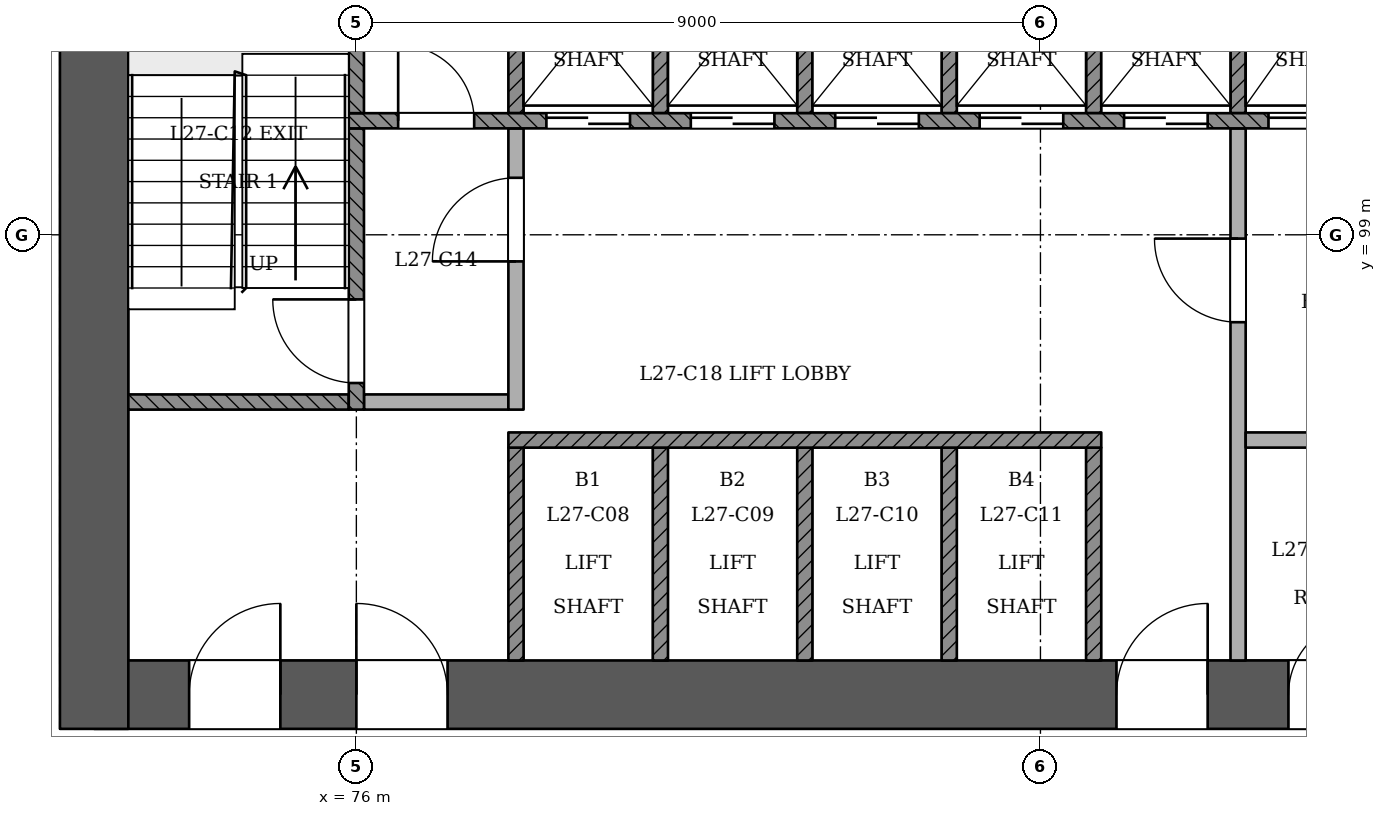
"""IFC4 building model, lengths in metres.
Left out: names, types, materials, properties, quantities, classifications, styles, units other than length and angle.
Written with IfcOpenShell. Run it as: python <this file> out.ifc"""

import sys

from ifc_helpers import new_model, si_unit, direction, frame, frame_2d, origin, place, context, subcontext, project, spatial, rectangle, extrude, element, fill, save


model = new_model("IFC4")
c1 = context("Model", 3, precision=1e-05, world=origin(), true_north=direction((0.0, 1.0)))
c2 = subcontext(c1, "Body", "Model", "MODEL_VIEW")
j1 = project(units=[si_unit("LENGTHUNIT", "METRE"), si_unit("PLANEANGLEUNIT", "RADIAN")], contexts=[c1])
p1 = place(None, origin())
s1 = spatial("IfcSite", under=j1, at=p1, CompositionType="ELEMENT")
p2 = place(p1, origin())
s2 = spatial("IfcBuilding", under=s1, at=p2, CompositionType="ELEMENT")
p3 = place(p2, frame((0.0, 0.0, 108.0)))
s3 = spatial("IfcBuildingStorey", under=s2, at=p3, CompositionType="ELEMENT", Elevation=108.0)
p4 = place(p3, frame((72.55, 92.95, 0.0), z_axis=(0.0, 0.0, 1.0), x_axis=(1.0, 0.0, 0.0)))
e1 = element("IfcWall", 1, at=p4, inside=s3, PredefinedType="SHEAR", context=c2, shape_type="SweptSolid", body=[
    extrude(rectangle(XDim=25.35, YDim=0.9, at=frame_2d((12.675, 0.0))), origin(), (0.0, 0.0, 1.0), 3.6),
])
p5 = place(p4, frame((1.25, 0.0, 0.0)))
e2 = element("IfcOpeningElement", 2, at=p5, cuts=e1, PredefinedType="OPENING", context=c2, shape_type="SweptSolid", body=[
    extrude(rectangle(XDim=1.2, YDim=2.1, at=frame_2d((0.6, 1.05))), frame((0.0, 0.46, 0.0), z_axis=(0.0, -1.0, 0.0), x_axis=(1.0, 0.0, 0.0)), (0.0, 0.0, 1.0), 0.921),
])
p6 = place(p4, frame((3.45, 0.0, 0.0)))
e3 = element("IfcOpeningElement", 3, at=p6, cuts=e1, PredefinedType="OPENING", context=c2, shape_type="SweptSolid", body=[
    extrude(rectangle(XDim=1.2, YDim=2.1, at=frame_2d((0.6, 1.05))), frame((0.0, 0.46, 0.0), z_axis=(0.0, -1.0, 0.0), x_axis=(1.0, 0.0, 0.0)), (0.0, 0.0, 1.0), 0.921),
])
p7 = place(p4, frame((13.45, 0.0, 0.0)))
e4 = element("IfcOpeningElement", 4, at=p7, cuts=e1, PredefinedType="OPENING", context=c2, shape_type="SweptSolid", body=[
    extrude(rectangle(XDim=1.2, YDim=2.1, at=frame_2d((0.6, 1.05))), frame((0.0, 0.46, 0.0), z_axis=(0.0, -1.0, 0.0), x_axis=(1.0, 0.0, 0.0)), (0.0, 0.0, 1.0), 0.921),
])
p8 = place(p4, frame((15.712, 0.0, 0.0)))
e5 = element("IfcOpeningElement", 5, at=p8, cuts=e1, PredefinedType="OPENING", context=c2, shape_type="SweptSolid", body=[
    extrude(rectangle(XDim=1.0, YDim=2.1, at=frame_2d((0.5, 1.05))), frame((0.0, 0.46, 0.0), z_axis=(0.0, -1.0, 0.0), x_axis=(1.0, 0.0, 0.0)), (0.0, 0.0, 1.0), 0.921),
])
p9 = place(p4, frame((18.35, 0.0, 0.0)))
e6 = element("IfcOpeningElement", 6, at=p9, cuts=e1, PredefinedType="OPENING", context=c2, shape_type="SweptSolid", body=[
    extrude(rectangle(XDim=1.0, YDim=2.1, at=frame_2d((0.5, 1.05))), frame((0.0, 0.46, 0.0), z_axis=(0.0, -1.0, 0.0), x_axis=(1.0, 0.0, 0.0)), (0.0, 0.0, 1.0), 0.921),
])
p10 = place(p4, frame((21.938, 0.0, 0.0)))
e7 = element("IfcOpeningElement", 7, at=p10, cuts=e1, PredefinedType="OPENING", context=c2, shape_type="SweptSolid", body=[
    extrude(rectangle(XDim=1.0, YDim=2.1, at=frame_2d((0.5, 1.05))), frame((0.0, 0.46, 0.0), z_axis=(0.0, -1.0, 0.0), x_axis=(1.0, 0.0, 0.0)), (0.0, 0.0, 1.0), 0.921),
])
p11 = place(p3, frame((72.55, 103.85, 0.0), z_axis=(0.0, 0.0, 1.0), x_axis=(0.0, -1.0, 0.0)))
e8 = element("IfcWall", 8, at=p11, inside=s3, PredefinedType="SHEAR", context=c2, shape_type="SweptSolid", body=[
    extrude(rectangle(XDim=11.35, YDim=0.9, at=frame_2d((5.675, 0.0))), origin(), (0.0, 0.0, 1.0), 3.6),
])
p12 = place(p3, frame((63.866, 97.84, 0.0), z_axis=(0.0, 0.0, 1.0), x_axis=(0.499996899578, -0.866027193807, 0.0)))
e9 = element("IfcWall", 9, at=p12, inside=s3, PredefinedType="PARTITIONING", context=c2, shape_type="SweptSolid", body=[
    extrude(rectangle(XDim=41.505, YDim=0.15, at=frame_2d((20.752, 0.0))), origin(), (0.0, 0.0, 1.0), 2.7),
])
p13 = place(p12, frame((2.792, 0.0, 0.0)))
e10 = element("IfcOpeningElement", 10, at=p13, cuts=e9, PredefinedType="OPENING", context=c2, shape_type="SweptSolid", body=[
    extrude(rectangle(XDim=1.2, YDim=2.1, at=frame_2d((0.6, 1.05))), frame((0.0, 0.085, 0.0), z_axis=(0.0, -1.0, 0.0), x_axis=(1.0, 0.0, 0.0)), (0.0, 0.0, 1.0), 0.171),
])
p14 = place(p12, frame((11.153, 0.0, 0.0)))
e11 = element("IfcOpeningElement", 11, at=p14, cuts=e9, PredefinedType="OPENING", context=c2, shape_type="SweptSolid", body=[
    extrude(rectangle(XDim=1.2, YDim=2.1, at=frame_2d((0.6, 1.05))), frame((0.0, 0.085, 0.0), z_axis=(0.0, -1.0, 0.0), x_axis=(1.0, 0.0, 0.0)), (0.0, 0.0, 1.0), 0.171),
])
p15 = place(p12, frame((22.403, 0.0, 0.0)))
e12 = element("IfcOpeningElement", 12, at=p15, cuts=e9, PredefinedType="OPENING", context=c2, shape_type="SweptSolid", body=[
    extrude(rectangle(XDim=1.2, YDim=2.1, at=frame_2d((0.6, 1.05))), frame((0.0, 0.085, 0.0), z_axis=(0.0, -1.0, 0.0), x_axis=(1.0, 0.0, 0.0)), (0.0, 0.0, 1.0), 0.171),
])
p16 = place(p12, frame((32.553, 0.0, 0.0)))
e13 = element("IfcOpeningElement", 13, at=p16, cuts=e9, PredefinedType="OPENING", context=c2, shape_type="SweptSolid", body=[
    extrude(rectangle(XDim=1.2, YDim=2.1, at=frame_2d((0.6, 1.05))), frame((0.0, 0.085, 0.0), z_axis=(0.0, -1.0, 0.0), x_axis=(1.0, 0.0, 0.0)), (0.0, 0.0, 1.0), 0.171),
])
p17 = place(p12, frame((39.864, 0.0, 0.0)))
e14 = element("IfcOpeningElement", 14, at=p17, cuts=e9, PredefinedType="OPENING", context=c2, shape_type="SweptSolid", body=[
    extrude(rectangle(XDim=1.0, YDim=2.1, at=frame_2d((0.5, 1.05))), frame((0.0, 0.085, 0.0), z_axis=(0.0, -1.0, 0.0), x_axis=(1.0, 0.0, 0.0)), (0.0, 0.0, 1.0), 0.171),
])
p18 = place(p3, frame((85.381, 61.895, 0.0), z_axis=(0.0, 0.0, 1.0), x_axis=(0.499996899578, 0.866027193807, 0.0)))
e15 = element("IfcWall", 15, at=p18, inside=s3, PredefinedType="PARTITIONING", context=c2, shape_type="SweptSolid", body=[
    extrude(rectangle(XDim=41.505, YDim=0.15, at=frame_2d((20.752, 0.0))), origin(), (0.0, 0.0, 1.0), 2.7),
])
p19 = place(p18, frame((0.226, 0.0, 0.0)))
e16 = element("IfcOpeningElement", 16, at=p19, cuts=e15, PredefinedType="OPENING", context=c2, shape_type="SweptSolid", body=[
    extrude(rectangle(XDim=1.2, YDim=2.1, at=frame_2d((0.6, 1.05))), frame((0.0, 0.085, 0.0), z_axis=(0.0, -1.0, 0.0), x_axis=(1.0, 0.0, 0.0)), (0.0, 0.0, 1.0), 0.171),
])
p20 = place(p18, frame((8.903, 0.0, 0.0)))
e17 = element("IfcOpeningElement", 17, at=p20, cuts=e15, PredefinedType="OPENING", context=c2, shape_type="SweptSolid", body=[
    extrude(rectangle(XDim=1.2, YDim=2.1, at=frame_2d((0.6, 1.05))), frame((0.0, 0.085, 0.0), z_axis=(0.0, -1.0, 0.0), x_axis=(1.0, 0.0, 0.0)), (0.0, 0.0, 1.0), 0.171),
])
p21 = place(p18, frame((22.403, 0.0, 0.0)))
e18 = element("IfcOpeningElement", 18, at=p21, cuts=e15, PredefinedType="OPENING", context=c2, shape_type="SweptSolid", body=[
    extrude(rectangle(XDim=1.2, YDim=2.1, at=frame_2d((0.6, 1.05))), frame((0.0, 0.085, 0.0), z_axis=(0.0, -1.0, 0.0), x_axis=(1.0, 0.0, 0.0)), (0.0, 0.0, 1.0), 0.171),
])
p22 = place(p18, frame((32.553, 0.0, 0.0)))
e19 = element("IfcOpeningElement", 19, at=p22, cuts=e15, PredefinedType="OPENING", context=c2, shape_type="SweptSolid", body=[
    extrude(rectangle(XDim=1.2, YDim=2.1, at=frame_2d((0.6, 1.05))), frame((0.0, 0.085, 0.0), z_axis=(0.0, -1.0, 0.0), x_axis=(1.0, 0.0, 0.0)), (0.0, 0.0, 1.0), 0.171),
])
p23 = place(p18, frame((40.024, 0.0, 0.0)))
e20 = element("IfcOpeningElement", 20, at=p23, cuts=e15, PredefinedType="OPENING", context=c2, shape_type="SweptSolid", body=[
    extrude(rectangle(XDim=1.2, YDim=2.1, at=frame_2d((0.6, 1.05))), frame((0.0, 0.085, 0.0), z_axis=(0.0, -1.0, 0.0), x_axis=(1.0, 0.0, 0.0)), (0.0, 0.0, 1.0), 0.171),
])
for number, where, z_axis, x_axis in (
    (21, (78.1, 93.4, 0.0), (0.0, 0.0, 1.0), (0.0, 1.0, 0.0)),
    (22, (80.0, 93.4, 0.0), (0.0, 0.0, 1.0), (0.0, 1.0, 0.0)),
    (23, (81.9, 93.4, 0.0), (0.0, 0.0, 1.0), (0.0, 1.0, 0.0)),
    (24, (83.8, 93.4, 0.0), (0.0, 0.0, 1.0), (0.0, 1.0, 0.0)),
    (25, (85.7, 93.4, 0.0), (0.0, 0.0, 1.0), (0.0, 1.0, 0.0)),
):
    element("IfcWall", number, at=place(p3, frame(where, z_axis=z_axis, x_axis=x_axis)), inside=s3, PredefinedType="SOLIDWALL", context=c2, shape_type="SweptSolid", body=[
        extrude(rectangle(XDim=2.8, YDim=0.2, at=frame_2d((1.4, 0.0))), origin(), (0.0, 0.0, 1.0), 3.1),
    ])
p24 = place(p3, frame((87.6, 93.4, 0.0), z_axis=(0.0, 0.0, 1.0), x_axis=(0.0, 1.0, 0.0)))
e26 = element("IfcWall", 26, at=p24, inside=s3, PredefinedType="PARTITIONING", context=c2, shape_type="SweptSolid", body=[
    extrude(rectangle(XDim=7.0, YDim=0.2, at=frame_2d((3.5, 0.0))), origin(), (0.0, 0.0, 1.0), 3.1),
])
p25 = place(p24, frame((4.45, 0.0, 0.0)))
e27 = element("IfcOpeningElement", 27, at=p25, cuts=e26, PredefinedType="OPENING", context=c2, shape_type="SweptSolid", body=[
    extrude(rectangle(XDim=1.1, YDim=2.1, at=frame_2d((0.55, 1.05))), frame((0.0, 0.11, 0.0), z_axis=(0.0, -1.0, 0.0), x_axis=(1.0, 0.0, 0.0)), (0.0, 0.0, 1.0), 0.221),
])
p26 = place(p3, frame((78.0, 96.3, 0.0), z_axis=(0.0, 0.0, 1.0), x_axis=(1.0, 0.0, 0.0)))
e28 = element("IfcWall", 28, at=p26, inside=s3, PredefinedType="SOLIDWALL", context=c2, shape_type="SweptSolid", body=[
    extrude(rectangle(XDim=7.8, YDim=0.2, at=frame_2d((3.9, 0.0))), origin(), (0.0, 0.0, 1.0), 3.1),
])
p27 = place(p3, frame((87.7, 96.3, 0.0), z_axis=(0.0, 0.0, 1.0), x_axis=(1.0, 0.0, 0.0)))
e29 = element("IfcWall", 29, at=p27, inside=s3, PredefinedType="PARTITIONING", context=c2, shape_type="SweptSolid", body=[
    extrude(rectangle(XDim=3.6, YDim=0.2, at=frame_2d((1.8, 0.0))), origin(), (0.0, 0.0, 1.0), 3.1),
])
p28 = place(p3, frame((73.0, 96.8, 0.0), z_axis=(0.0, 0.0, 1.0), x_axis=(1.0, 0.0, 0.0)))
e30 = element("IfcWall", 30, at=p28, inside=s3, PredefinedType="SOLIDWALL", context=c2, shape_type="SweptSolid", body=[
    extrude(rectangle(XDim=2.9, YDim=0.2, at=frame_2d((1.45, 0.0))), origin(), (0.0, 0.0, 1.0), 3.1),
])
p29 = place(p3, frame((76.0, 96.7, 0.0), z_axis=(0.0, 0.0, 1.0), x_axis=(0.0, 1.0, 0.0)))
e31 = element("IfcWall", 31, at=p29, inside=s3, PredefinedType="SOLIDWALL", context=c2, shape_type="SweptSolid", body=[
    extrude(rectangle(XDim=3.7, YDim=0.2, at=frame_2d((1.85, 0.0))), origin(), (0.0, 0.0, 1.0), 3.1),
])
p30 = place(p29, frame((0.35, 0.0, 0.0)))
e32 = element("IfcOpeningElement", 32, at=p30, cuts=e31, PredefinedType="OPENING", context=c2, shape_type="SweptSolid", body=[
    extrude(rectangle(XDim=1.1, YDim=2.1, at=frame_2d((0.55, 1.05))), frame((0.0, 0.11, 0.0), z_axis=(0.0, -1.0, 0.0), x_axis=(1.0, 0.0, 0.0)), (0.0, 0.0, 1.0), 0.221),
])
p31 = place(p3, frame((76.1, 96.8, 0.0), z_axis=(0.0, 0.0, 1.0), x_axis=(1.0, 0.0, 0.0)))
e33 = element("IfcWall", 33, at=p31, inside=s3, PredefinedType="PARTITIONING", context=c2, shape_type="SweptSolid", body=[
    extrude(rectangle(XDim=1.9, YDim=0.2, at=frame_2d((0.95, 0.0))), origin(), (0.0, 0.0, 1.0), 3.1),
])
p32 = place(p3, frame((78.1, 96.7, 0.0), z_axis=(0.0, 0.0, 1.0), x_axis=(0.0, 1.0, 0.0)))
e34 = element("IfcWall", 34, at=p32, inside=s3, PredefinedType="PARTITIONING", context=c2, shape_type="SweptSolid", body=[
    extrude(rectangle(XDim=3.7, YDim=0.2, at=frame_2d((1.85, 0.0))), origin(), (0.0, 0.0, 1.0), 3.1),
])
p33 = place(p32, frame((1.95, 0.0, 0.0)))
e35 = element("IfcOpeningElement", 35, at=p33, cuts=e34, PredefinedType="OPENING", context=c2, shape_type="SweptSolid", body=[
    extrude(rectangle(XDim=1.1, YDim=2.1, at=frame_2d((0.55, 1.05))), frame((0.0, 0.11, 0.0), z_axis=(0.0, -1.0, 0.0), x_axis=(1.0, 0.0, 0.0)), (0.0, 0.0, 1.0), 0.221),
])
p34 = place(p3, frame((75.9, 100.5, 0.0), z_axis=(0.0, 0.0, 1.0), x_axis=(1.0, 0.0, 0.0)))
e36 = element("IfcWall", 36, at=p34, inside=s3, PredefinedType="SOLIDWALL", context=c2, shape_type="SweptSolid", body=[
    extrude(rectangle(XDim=18.2, YDim=0.2, at=frame_2d((9.1, 0.0))), origin(), (0.0, 0.0, 1.0), 3.1),
])
p35 = place(p34, frame((2.6, 0.0, 0.0)))
e37 = element("IfcOpeningElement", 37, at=p35, cuts=e36, PredefinedType="OPENING", context=c2, shape_type="SweptSolid", body=[
    extrude(rectangle(XDim=1.1, YDim=2.1, at=frame_2d((0.55, 1.05))), frame((0.0, 0.11, 0.0), z_axis=(0.0, -1.0, 0.0), x_axis=(1.0, 0.0, 0.0)), (0.0, 0.0, 1.0), 0.221),
])
p36 = place(p34, frame((4.5, 0.0, 0.0)))
e38 = element("IfcOpeningElement", 38, at=p36, cuts=e36, PredefinedType="OPENING", context=c2, shape_type="SweptSolid", body=[
    extrude(rectangle(XDim=1.1, YDim=2.1, at=frame_2d((0.55, 1.05))), frame((0.0, 0.11, 0.0), z_axis=(0.0, -1.0, 0.0), x_axis=(1.0, 0.0, 0.0)), (0.0, 0.0, 1.0), 0.221),
])
p37 = place(p34, frame((6.4, 0.0, 0.0)))
e39 = element("IfcOpeningElement", 39, at=p37, cuts=e36, PredefinedType="OPENING", context=c2, shape_type="SweptSolid", body=[
    extrude(rectangle(XDim=1.1, YDim=2.1, at=frame_2d((0.55, 1.05))), frame((0.0, 0.11, 0.0), z_axis=(0.0, -1.0, 0.0), x_axis=(1.0, 0.0, 0.0)), (0.0, 0.0, 1.0), 0.221),
])
p38 = place(p34, frame((8.3, 0.0, 0.0)))
e40 = element("IfcOpeningElement", 40, at=p38, cuts=e36, PredefinedType="OPENING", context=c2, shape_type="SweptSolid", body=[
    extrude(rectangle(XDim=1.1, YDim=2.1, at=frame_2d((0.55, 1.05))), frame((0.0, 0.11, 0.0), z_axis=(0.0, -1.0, 0.0), x_axis=(1.0, 0.0, 0.0)), (0.0, 0.0, 1.0), 0.221),
])
p39 = place(p34, frame((10.2, 0.0, 0.0)))
e41 = element("IfcOpeningElement", 41, at=p39, cuts=e36, PredefinedType="OPENING", context=c2, shape_type="SweptSolid", body=[
    extrude(rectangle(XDim=1.1, YDim=2.1, at=frame_2d((0.55, 1.05))), frame((0.0, 0.11, 0.0), z_axis=(0.0, -1.0, 0.0), x_axis=(1.0, 0.0, 0.0)), (0.0, 0.0, 1.0), 0.221),
])
p40 = place(p34, frame((12.1, 0.0, 0.0)))
e42 = element("IfcOpeningElement", 42, at=p40, cuts=e36, PredefinedType="OPENING", context=c2, shape_type="SweptSolid", body=[
    extrude(rectangle(XDim=1.1, YDim=2.1, at=frame_2d((0.55, 1.05))), frame((0.0, 0.11, 0.0), z_axis=(0.0, -1.0, 0.0), x_axis=(1.0, 0.0, 0.0)), (0.0, 0.0, 1.0), 0.221),
])
p41 = place(p34, frame((14.0, 0.0, 0.0)))
e43 = element("IfcOpeningElement", 43, at=p41, cuts=e36, PredefinedType="OPENING", context=c2, shape_type="SweptSolid", body=[
    extrude(rectangle(XDim=1.1, YDim=2.1, at=frame_2d((0.55, 1.05))), frame((0.0, 0.11, 0.0), z_axis=(0.0, -1.0, 0.0), x_axis=(1.0, 0.0, 0.0)), (0.0, 0.0, 1.0), 0.221),
])
p42 = place(p34, frame((0.65, 0.0, 0.0)))
e44 = element("IfcOpeningElement", 44, at=p42, cuts=e36, PredefinedType="OPENING", context=c2, shape_type="SweptSolid", body=[
    extrude(rectangle(XDim=1.0, YDim=2.1, at=frame_2d((0.5, 1.05))), frame((0.0, 0.11, 0.0), z_axis=(0.0, -1.0, 0.0), x_axis=(1.0, 0.0, 0.0)), (0.0, 0.0, 1.0), 0.221),
])
p43 = place(p34, frame((16.3, 0.0, 0.0)))
e45 = element("IfcOpeningElement", 45, at=p43, cuts=e36, PredefinedType="OPENING", context=c2, shape_type="SweptSolid", body=[
    extrude(rectangle(XDim=1.0, YDim=2.1, at=frame_2d((0.5, 1.05))), frame((0.0, 0.11, 0.0), z_axis=(0.0, -1.0, 0.0), x_axis=(1.0, 0.0, 0.0)), (0.0, 0.0, 1.0), 0.221),
])
for number, where, z_axis, x_axis in (
    (46, (76.0, 100.6, 0.0), (0.0, 0.0, 1.0), (0.0, 1.0, 0.0)),
    (47, (78.1, 100.6, 0.0), (0.0, 0.0, 1.0), (0.0, 1.0, 0.0)),
    (48, (80.0, 100.6, 0.0), (0.0, 0.0, 1.0), (0.0, 1.0, 0.0)),
    (49, (81.9, 100.6, 0.0), (0.0, 0.0, 1.0), (0.0, 1.0, 0.0)),
    (50, (83.8, 100.6, 0.0), (0.0, 0.0, 1.0), (0.0, 1.0, 0.0)),
    (51, (85.7, 100.6, 0.0), (0.0, 0.0, 1.0), (0.0, 1.0, 0.0)),
    (52, (87.6, 100.6, 0.0), (0.0, 0.0, 1.0), (0.0, 1.0, 0.0)),
):
    element("IfcWall", number, at=place(p3, frame(where, z_axis=z_axis, x_axis=x_axis)), inside=s3, PredefinedType="SOLIDWALL", context=c2, shape_type="SweptSolid", body=[
        extrude(rectangle(XDim=2.8, YDim=0.2, at=frame_2d((1.4, 0.0))), origin(), (0.0, 0.0, 1.0), 3.1),
    ])
p44 = place(p35, origin())
e53 = element("IfcDoor", 53, at=p44, inside=s3, OperationType="SLIDING_TO_RIGHT", PredefinedType="NOTDEFINED", context=c2, shape_type="SweptSolid", body=[
    extrude(rectangle(XDim=1.1, YDim=2.1, at=frame_2d((0.55, 1.05))), frame((0.0, 0.025, 0.0), z_axis=(0.0, -1.0, 0.0), x_axis=(1.0, 0.0, 0.0)), (0.0, 0.0, 1.0), 0.05),
])
fill(e37, e53)
p45 = place(p36, origin())
e54 = element("IfcDoor", 54, at=p45, inside=s3, OperationType="SLIDING_TO_LEFT", PredefinedType="NOTDEFINED", context=c2, shape_type="SweptSolid", body=[
    extrude(rectangle(XDim=1.1, YDim=2.1, at=frame_2d((0.55, 1.05))), frame((0.0, 0.025, 0.0), z_axis=(0.0, -1.0, 0.0), x_axis=(1.0, 0.0, 0.0)), (0.0, 0.0, 1.0), 0.05),
])
fill(e38, e54)
p46 = place(p37, origin())
e55 = element("IfcDoor", 55, at=p46, inside=s3, OperationType="SLIDING_TO_RIGHT", PredefinedType="NOTDEFINED", context=c2, shape_type="SweptSolid", body=[
    extrude(rectangle(XDim=1.1, YDim=2.1, at=frame_2d((0.55, 1.05))), frame((0.0, 0.025, 0.0), z_axis=(0.0, -1.0, 0.0), x_axis=(1.0, 0.0, 0.0)), (0.0, 0.0, 1.0), 0.05),
])
fill(e39, e55)
p47 = place(p38, origin())
e56 = element("IfcDoor", 56, at=p47, inside=s3, OperationType="SLIDING_TO_LEFT", PredefinedType="NOTDEFINED", context=c2, shape_type="SweptSolid", body=[
    extrude(rectangle(XDim=1.1, YDim=2.1, at=frame_2d((0.55, 1.05))), frame((0.0, 0.025, 0.0), z_axis=(0.0, -1.0, 0.0), x_axis=(1.0, 0.0, 0.0)), (0.0, 0.0, 1.0), 0.05),
])
fill(e40, e56)
p48 = place(p39, origin())
e57 = element("IfcDoor", 57, at=p48, inside=s3, OperationType="SLIDING_TO_RIGHT", PredefinedType="NOTDEFINED", context=c2, shape_type="SweptSolid", body=[
    extrude(rectangle(XDim=1.1, YDim=2.1, at=frame_2d((0.55, 1.05))), frame((0.0, 0.025, 0.0), z_axis=(0.0, -1.0, 0.0), x_axis=(1.0, 0.0, 0.0)), (0.0, 0.0, 1.0), 0.05),
])
fill(e41, e57)
p49 = place(p40, origin())
e58 = element("IfcDoor", 58, at=p49, inside=s3, OperationType="SLIDING_TO_RIGHT", PredefinedType="NOTDEFINED", context=c2, shape_type="SweptSolid", body=[
    extrude(rectangle(XDim=1.1, YDim=2.1, at=frame_2d((0.55, 1.05))), frame((0.0, 0.025, 0.0), z_axis=(0.0, -1.0, 0.0), x_axis=(1.0, 0.0, 0.0)), (0.0, 0.0, 1.0), 0.05),
])
fill(e42, e58)
p50 = place(p30, origin())
e59 = element("IfcDoor", 59, at=p50, inside=s3, OperationType="SINGLE_SWING_RIGHT", PredefinedType="NOTDEFINED", context=c2, shape_type="SweptSolid", body=[
    extrude(rectangle(XDim=1.1, YDim=2.1, at=frame_2d((0.55, 1.05))), frame((0.0, 0.025, 0.0), z_axis=(0.0, -1.0, 0.0), x_axis=(1.0, 0.0, 0.0)), (0.0, 0.0, 1.0), 0.05),
])
fill(e32, e59)
p51 = place(p33, origin())
e60 = element("IfcDoor", 60, at=p51, inside=s3, OperationType="SINGLE_SWING_LEFT", PredefinedType="NOTDEFINED", context=c2, shape_type="SweptSolid", body=[
    extrude(rectangle(XDim=1.1, YDim=2.1, at=frame_2d((0.55, 1.05))), frame((0.0, 0.025, 0.0), z_axis=(0.0, -1.0, 0.0), x_axis=(1.0, 0.0, 0.0)), (0.0, 0.0, 1.0), 0.05),
])
fill(e35, e60)
p52 = place(p25, origin())
e61 = element("IfcDoor", 61, at=p52, inside=s3, OperationType="SINGLE_SWING_RIGHT", PredefinedType="NOTDEFINED", context=c2, shape_type="SweptSolid", body=[
    extrude(rectangle(XDim=1.1, YDim=2.1, at=frame_2d((0.55, 1.05))), frame((0.0, 0.025, 0.0), z_axis=(0.0, -1.0, 0.0), x_axis=(1.0, 0.0, 0.0)), (0.0, 0.0, 1.0), 0.05),
])
fill(e27, e61)
p53 = place(p5, origin())
e62 = element("IfcDoor", 62, at=p53, inside=s3, OperationType="SINGLE_SWING_RIGHT", PredefinedType="NOTDEFINED", context=c2, shape_type="SweptSolid", body=[
    extrude(rectangle(XDim=1.2, YDim=2.1, at=frame_2d((0.6, 1.05))), frame((0.0, 0.025, 0.0), z_axis=(0.0, -1.0, 0.0), x_axis=(1.0, 0.0, 0.0)), (0.0, 0.0, 1.0), 0.05),
])
fill(e2, e62)
p54 = place(p6, origin())
e63 = element("IfcDoor", 63, at=p54, inside=s3, OperationType="SINGLE_SWING_LEFT", PredefinedType="NOTDEFINED", context=c2, shape_type="SweptSolid", body=[
    extrude(rectangle(XDim=1.2, YDim=2.1, at=frame_2d((0.6, 1.05))), frame((0.0, 0.025, 0.0), z_axis=(0.0, -1.0, 0.0), x_axis=(1.0, 0.0, 0.0)), (0.0, 0.0, 1.0), 0.05),
])
fill(e3, e63)
p55 = place(p7, origin())
e64 = element("IfcDoor", 64, at=p55, inside=s3, OperationType="SINGLE_SWING_RIGHT", PredefinedType="NOTDEFINED", context=c2, shape_type="SweptSolid", body=[
    extrude(rectangle(XDim=1.2, YDim=2.1, at=frame_2d((0.6, 1.05))), frame((0.0, 0.025, 0.0), z_axis=(0.0, -1.0, 0.0), x_axis=(1.0, 0.0, 0.0)), (0.0, 0.0, 1.0), 0.05),
])
fill(e4, e64)
p56 = place(p42, origin())
e65 = element("IfcDoor", 65, at=p56, inside=s3, OperationType="SINGLE_SWING_LEFT", PredefinedType="NOTDEFINED", context=c2, shape_type="SweptSolid", body=[
    extrude(rectangle(XDim=1.0, YDim=2.1, at=frame_2d((0.5, 1.05))), frame((0.0, 0.025, 0.0), z_axis=(0.0, -1.0, 0.0), x_axis=(1.0, 0.0, 0.0)), (0.0, 0.0, 1.0), 0.05),
])
fill(e44, e65)
p57 = place(p8, origin())
e66 = element("IfcDoor", 66, at=p57, inside=s3, OperationType="SINGLE_SWING_RIGHT", PredefinedType="NOTDEFINED", context=c2, shape_type="SweptSolid", body=[
    extrude(rectangle(XDim=1.0, YDim=2.1, at=frame_2d((0.5, 1.05))), frame((0.0, 0.025, 0.0), z_axis=(0.0, -1.0, 0.0), x_axis=(1.0, 0.0, 0.0)), (0.0, 0.0, 1.0), 0.05),
])
fill(e5, e66)
save(model, sys.argv[1])
